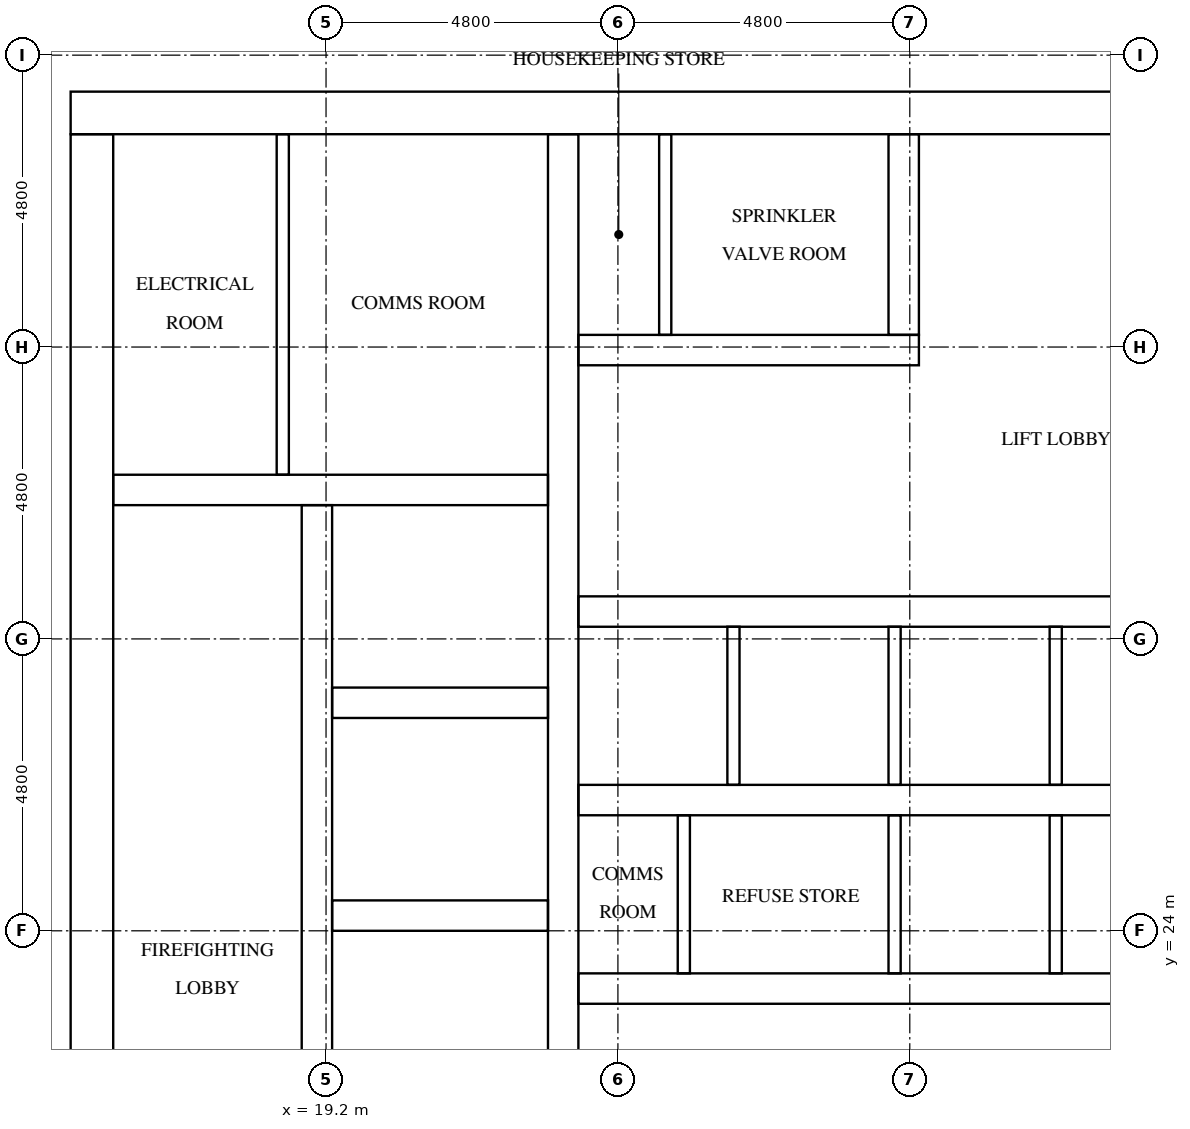
"""IFC4 building model, lengths in metres.
Left out: names, types, materials, properties, quantities, classifications, styles, units other than length and angle.
Written with IfcOpenShell. Run it as: python <this file> out.ifc"""

import sys

from ifc_helpers import new_model, si_unit, direction, frame, frame_2d, origin, place, context, subcontext, project, spatial, rectangle, extrude, element, fill, save


model = new_model("IFC4")
c1 = context("Model", 3, precision=1e-05, world=origin(), true_north=direction((0.0, 1.0)))
c2 = subcontext(c1, "Body", "Model", "MODEL_VIEW")
j1 = project(units=[si_unit("LENGTHUNIT", "METRE"), si_unit("PLANEANGLEUNIT", "RADIAN")], contexts=[c1])
p1 = place(None, origin())
s1 = spatial("IfcSite", under=j1, at=p1, CompositionType="ELEMENT")
p2 = place(p1, origin())
s2 = spatial("IfcBuilding", under=s1, at=p2, CompositionType="ELEMENT")
p3 = place(p2, frame((0.0, 0.0, 222.8)))
s3 = spatial("IfcBuildingStorey", under=s2, at=p3, CompositionType="ELEMENT", Elevation=222.8)
p4 = place(p3, frame((15.0, 37.45, 0.0), z_axis=(0.0, 0.0, 1.0), x_axis=(1.0, 0.0, 0.0)))
e1 = element("IfcWall", 1, at=p4, inside=s3, PredefinedType="SHEAR", context=c2, shape_type="SweptSolid", body=[
    extrude(rectangle(XDim=32.4, YDim=0.7, at=frame_2d((16.2, 0.0))), origin(), (0.0, 0.0, 1.0), 3.2),
])
p5 = place(p4, frame((15.3, 0.0, 0.0)))
e2 = element("IfcOpeningElement", 2, at=p5, cuts=e1, PredefinedType="OPENING", context=c2, shape_type="SweptSolid", body=[
    extrude(rectangle(XDim=1.8, YDim=2.1, at=frame_2d((0.9, 1.05))), frame((0.0, 0.36, 0.0), z_axis=(0.0, -1.0, 0.0), x_axis=(1.0, 0.0, 0.0)), (0.0, 0.0, 1.0), 0.72),
])
p6 = place(p4, frame((1.544, 0.0, 0.0)))
e3 = element("IfcOpeningElement", 3, at=p6, cuts=e1, PredefinedType="OPENING", context=c2, shape_type="SweptSolid", body=[
    extrude(rectangle(XDim=1.0, YDim=2.1, at=frame_2d((0.5, 1.05))), frame((0.0, 0.36, 0.0), z_axis=(0.0, -1.0, 0.0), x_axis=(1.0, 0.0, 0.0)), (0.0, 0.0, 1.0), 0.72),
])
p7 = place(p4, frame((5.219, 0.0, 0.0)))
e4 = element("IfcOpeningElement", 4, at=p7, cuts=e1, PredefinedType="OPENING", context=c2, shape_type="SweptSolid", body=[
    extrude(rectangle(XDim=1.0, YDim=2.1, at=frame_2d((0.5, 1.05))), frame((0.0, 0.36, 0.0), z_axis=(0.0, -1.0, 0.0), x_axis=(1.0, 0.0, 0.0)), (0.0, 0.0, 1.0), 0.72),
])
p8 = place(p3, frame((15.35, 15.7, 0.0), z_axis=(0.0, 0.0, 1.0), x_axis=(0.0, 1.0, 0.0)))
e5 = element("IfcWall", 5, at=p8, inside=s3, PredefinedType="SHEAR", context=c2, shape_type="SweptSolid", body=[
    extrude(rectangle(XDim=21.4, YDim=0.7, at=frame_2d((10.7, 0.0))), origin(), (0.0, 0.0, 1.0), 3.2),
])
p9 = place(p8, frame((5.06, 0.0, 0.0)))
e6 = element("IfcOpeningElement", 6, at=p9, cuts=e5, PredefinedType="OPENING", context=c2, shape_type="SweptSolid", body=[
    extrude(rectangle(XDim=1.2, YDim=2.1, at=frame_2d((0.6, 1.05))), frame((0.0, 0.36, 0.0), z_axis=(0.0, -1.0, 0.0), x_axis=(1.0, 0.0, 0.0)), (0.0, 0.0, 1.0), 0.72),
])
p10 = place(p3, frame((19.05, 15.7, 0.0), z_axis=(0.0, 0.0, 1.0), x_axis=(0.0, 1.0, 0.0)))
e7 = element("IfcWall", 7, at=p10, inside=s3, PredefinedType="SHEAR", context=c2, shape_type="SweptSolid", body=[
    extrude(rectangle(XDim=15.3, YDim=0.5, at=frame_2d((7.65, 0.0))), origin(), (0.0, 0.0, 1.0), 3.2),
])
p11 = place(p10, frame((9.75, 0.0, 0.0)))
e8 = element("IfcOpeningElement", 8, at=p11, cuts=e7, PredefinedType="OPENING", context=c2, shape_type="SweptSolid", body=[
    extrude(rectangle(XDim=1.1, YDim=2.1, at=frame_2d((0.55, 1.05))), frame((0.0, 0.26, 0.0), z_axis=(0.0, -1.0, 0.0), x_axis=(1.0, 0.0, 0.0)), (0.0, 0.0, 1.0), 0.52),
])
p12 = place(p10, frame((13.25, 0.0, 0.0)))
e9 = element("IfcOpeningElement", 9, at=p12, cuts=e7, PredefinedType="OPENING", context=c2, shape_type="SweptSolid", body=[
    extrude(rectangle(XDim=1.1, YDim=2.1, at=frame_2d((0.55, 1.05))), frame((0.0, 0.26, 0.0), z_axis=(0.0, -1.0, 0.0), x_axis=(1.0, 0.0, 0.0)), (0.0, 0.0, 1.0), 0.52),
])
p13 = place(p10, frame((0.5, 0.0, 0.0)))
e10 = element("IfcOpeningElement", 10, at=p13, cuts=e7, PredefinedType="OPENING", context=c2, shape_type="SweptSolid", body=[
    extrude(rectangle(XDim=1.2, YDim=2.1, at=frame_2d((0.6, 1.05))), frame((0.0, 0.26, 0.0), z_axis=(0.0, -1.0, 0.0), x_axis=(1.0, 0.0, 0.0)), (0.0, 0.0, 1.0), 0.52),
])
p14 = place(p3, frame((23.1, 15.7, 0.0), z_axis=(0.0, 0.0, 1.0), x_axis=(0.0, 1.0, 0.0)))
e11 = element("IfcWall", 11, at=p14, inside=s3, PredefinedType="SHEAR", context=c2, shape_type="SweptSolid", body=[
    extrude(rectangle(XDim=21.4, YDim=0.5, at=frame_2d((10.7, 0.0))), origin(), (0.0, 0.0, 1.0), 3.2),
])
for number, where, z_axis, x_axis in (
    (12, (19.3, 24.25, 0.0), (0.0, 0.0, 1.0), (1.0, 0.0, 0.0)),
    (13, (19.3, 27.75, 0.0), (0.0, 0.0, 1.0), (1.0, 0.0, 0.0)),
):
    element("IfcWall", number, at=place(p3, frame(where, z_axis=z_axis, x_axis=x_axis)), inside=s3, PredefinedType="SHEAR", context=c2, shape_type="SweptSolid", body=[
        extrude(rectangle(XDim=3.55, YDim=0.5, at=frame_2d((1.775, 0.0))), origin(), (0.0, 0.0, 1.0), 3.2),
    ])
p15 = place(p3, frame((15.7, 31.25, 0.0), z_axis=(0.0, 0.0, 1.0), x_axis=(1.0, 0.0, 0.0)))
e14 = element("IfcWall", 14, at=p15, inside=s3, PredefinedType="SHEAR", context=c2, shape_type="SweptSolid", body=[
    extrude(rectangle(XDim=7.15, YDim=0.5, at=frame_2d((3.575, 0.0))), origin(), (0.0, 0.0, 1.0), 3.2),
])
p16 = place(p3, frame((23.35, 23.05, 0.0), z_axis=(0.0, 0.0, 1.0), x_axis=(1.0, 0.0, 0.0)))
e15 = element("IfcWall", 15, at=p16, inside=s3, PredefinedType="SHEAR", context=c2, shape_type="SweptSolid", body=[
    extrude(rectangle(XDim=15.7, YDim=0.5, at=frame_2d((7.85, 0.0))), origin(), (0.0, 0.0, 1.0), 3.2),
])
p17 = place(p16, frame((0.317, 0.0, 0.0)))
e16 = element("IfcOpeningElement", 16, at=p17, cuts=e15, PredefinedType="OPENING", context=c2, shape_type="SweptSolid", body=[
    extrude(rectangle(XDim=1.0, YDim=2.1, at=frame_2d((0.5, 1.05))), frame((0.0, 0.26, 0.0), z_axis=(0.0, -1.0, 0.0), x_axis=(1.0, 0.0, 0.0)), (0.0, 0.0, 1.0), 0.52),
])
p18 = place(p16, frame((2.967, 0.0, 0.0)))
e17 = element("IfcOpeningElement", 17, at=p18, cuts=e15, PredefinedType="OPENING", context=c2, shape_type="SweptSolid", body=[
    extrude(rectangle(XDim=1.0, YDim=2.1, at=frame_2d((0.5, 1.05))), frame((0.0, 0.26, 0.0), z_axis=(0.0, -1.0, 0.0), x_axis=(1.0, 0.0, 0.0)), (0.0, 0.0, 1.0), 0.52),
])
p19 = place(p16, frame((10.917, 0.0, 0.0)))
e18 = element("IfcOpeningElement", 18, at=p19, cuts=e15, PredefinedType="OPENING", context=c2, shape_type="SweptSolid", body=[
    extrude(rectangle(XDim=1.0, YDim=2.1, at=frame_2d((0.5, 1.05))), frame((0.0, 0.26, 0.0), z_axis=(0.0, -1.0, 0.0), x_axis=(1.0, 0.0, 0.0)), (0.0, 0.0, 1.0), 0.52),
])
p20 = place(p16, frame((13.567, 0.0, 0.0)))
e19 = element("IfcOpeningElement", 19, at=p20, cuts=e15, PredefinedType="OPENING", context=c2, shape_type="SweptSolid", body=[
    extrude(rectangle(XDim=1.0, YDim=2.1, at=frame_2d((0.5, 1.05))), frame((0.0, 0.26, 0.0), z_axis=(0.0, -1.0, 0.0), x_axis=(1.0, 0.0, 0.0)), (0.0, 0.0, 1.0), 0.52),
])
p21 = place(p3, frame((23.35, 26.15, 0.0), z_axis=(0.0, 0.0, 1.0), x_axis=(1.0, 0.0, 0.0)))
e20 = element("IfcWall", 20, at=p21, inside=s3, PredefinedType="SHEAR", context=c2, shape_type="SweptSolid", body=[
    extrude(rectangle(XDim=15.7, YDim=0.5, at=frame_2d((7.85, 0.0))), origin(), (0.0, 0.0, 1.0), 3.2),
])
p22 = place(p3, frame((23.35, 29.25, 0.0), z_axis=(0.0, 0.0, 1.0), x_axis=(1.0, 0.0, 0.0)))
e21 = element("IfcWall", 21, at=p22, inside=s3, PredefinedType="SHEAR", context=c2, shape_type="SweptSolid", body=[
    extrude(rectangle(XDim=15.7, YDim=0.5, at=frame_2d((7.85, 0.0))), origin(), (0.0, 0.0, 1.0), 3.2),
])
p23 = place(p22, frame((0.675, 0.0, 0.0)))
e22 = element("IfcOpeningElement", 22, at=p23, cuts=e21, PredefinedType="OPENING", context=c2, shape_type="SweptSolid", body=[
    extrude(rectangle(XDim=1.1, YDim=2.1, at=frame_2d((0.55, 1.05))), frame((0.0, 0.26, 0.0), z_axis=(0.0, -1.0, 0.0), x_axis=(1.0, 0.0, 0.0)), (0.0, 0.0, 1.0), 0.52),
])
p24 = place(p22, frame((3.325, 0.0, 0.0)))
e23 = element("IfcOpeningElement", 23, at=p24, cuts=e21, PredefinedType="OPENING", context=c2, shape_type="SweptSolid", body=[
    extrude(rectangle(XDim=1.1, YDim=2.1, at=frame_2d((0.55, 1.05))), frame((0.0, 0.26, 0.0), z_axis=(0.0, -1.0, 0.0), x_axis=(1.0, 0.0, 0.0)), (0.0, 0.0, 1.0), 0.52),
])
p25 = place(p22, frame((5.975, 0.0, 0.0)))
e24 = element("IfcOpeningElement", 24, at=p25, cuts=e21, PredefinedType="OPENING", context=c2, shape_type="SweptSolid", body=[
    extrude(rectangle(XDim=1.1, YDim=2.1, at=frame_2d((0.55, 1.05))), frame((0.0, 0.26, 0.0), z_axis=(0.0, -1.0, 0.0), x_axis=(1.0, 0.0, 0.0)), (0.0, 0.0, 1.0), 0.52),
])
p26 = place(p22, frame((8.625, 0.0, 0.0)))
e25 = element("IfcOpeningElement", 25, at=p26, cuts=e21, PredefinedType="OPENING", context=c2, shape_type="SweptSolid", body=[
    extrude(rectangle(XDim=1.1, YDim=2.1, at=frame_2d((0.55, 1.05))), frame((0.0, 0.26, 0.0), z_axis=(0.0, -1.0, 0.0), x_axis=(1.0, 0.0, 0.0)), (0.0, 0.0, 1.0), 0.52),
])
p27 = place(p22, frame((11.275, 0.0, 0.0)))
e26 = element("IfcOpeningElement", 26, at=p27, cuts=e21, PredefinedType="OPENING", context=c2, shape_type="SweptSolid", body=[
    extrude(rectangle(XDim=1.1, YDim=2.1, at=frame_2d((0.55, 1.05))), frame((0.0, 0.26, 0.0), z_axis=(0.0, -1.0, 0.0), x_axis=(1.0, 0.0, 0.0)), (0.0, 0.0, 1.0), 0.52),
])
p28 = place(p22, frame((13.925, 0.0, 0.0)))
e27 = element("IfcOpeningElement", 27, at=p28, cuts=e21, PredefinedType="OPENING", context=c2, shape_type="SweptSolid", body=[
    extrude(rectangle(XDim=1.1, YDim=2.1, at=frame_2d((0.55, 1.05))), frame((0.0, 0.26, 0.0), z_axis=(0.0, -1.0, 0.0), x_axis=(1.0, 0.0, 0.0)), (0.0, 0.0, 1.0), 0.52),
])
p29 = place(p3, frame((23.35, 33.55, 0.0), z_axis=(0.0, 0.0, 1.0), x_axis=(1.0, 0.0, 0.0)))
e28 = element("IfcWall", 28, at=p29, inside=s3, PredefinedType="SHEAR", context=c2, shape_type="SweptSolid", body=[
    extrude(rectangle(XDim=5.6, YDim=0.5, at=frame_2d((2.8, 0.0))), origin(), (0.0, 0.0, 1.0), 3.2),
])
p30 = place(p29, frame((0.164, 0.0, 0.0)))
e29 = element("IfcOpeningElement", 29, at=p30, cuts=e28, PredefinedType="OPENING", context=c2, shape_type="SweptSolid", body=[
    extrude(rectangle(XDim=1.0, YDim=2.1, at=frame_2d((0.5, 1.05))), frame((0.0, 0.26, 0.0), z_axis=(0.0, -1.0, 0.0), x_axis=(1.0, 0.0, 0.0)), (0.0, 0.0, 1.0), 0.52),
])
p31 = place(p29, frame((2.814, 0.0, 0.0)))
e30 = element("IfcOpeningElement", 30, at=p31, cuts=e28, PredefinedType="OPENING", context=c2, shape_type="SweptSolid", body=[
    extrude(rectangle(XDim=1.0, YDim=2.1, at=frame_2d((0.5, 1.05))), frame((0.0, 0.26, 0.0), z_axis=(0.0, -1.0, 0.0), x_axis=(1.0, 0.0, 0.0)), (0.0, 0.0, 1.0), 0.52),
])
p32 = place(p3, frame((28.7, 33.8, 0.0), z_axis=(0.0, 0.0, 1.0), x_axis=(0.0, 1.0, 0.0)))
e31 = element("IfcWall", 31, at=p32, inside=s3, PredefinedType="SHEAR", context=c2, shape_type="SweptSolid", body=[
    extrude(rectangle(XDim=3.3, YDim=0.5, at=frame_2d((1.65, 0.0))), origin(), (0.0, 0.0, 1.0), 3.2),
])
p33 = place(p3, frame((25.9, 26.4, 0.0), z_axis=(0.0, 0.0, 1.0), x_axis=(0.0, 1.0, 0.0)))
e32 = element("IfcWall", 32, at=p33, inside=s3, PredefinedType="SOLIDWALL", context=c2, shape_type="SweptSolid", body=[
    extrude(rectangle(XDim=2.6, YDim=0.2, at=frame_2d((1.3, 0.0))), origin(), (0.0, 0.0, 1.0), 3.2),
])
p34 = place(p3, frame((28.55, 23.3, 0.0), z_axis=(0.0, 0.0, 1.0), x_axis=(0.0, 1.0, 0.0)))
e33 = element("IfcWall", 33, at=p34, inside=s3, PredefinedType="SOLIDWALL", context=c2, shape_type="SweptSolid", body=[
    extrude(rectangle(XDim=2.6, YDim=0.2, at=frame_2d((1.3, 0.0))), origin(), (0.0, 0.0, 1.0), 3.2),
])
p35 = place(p3, frame((28.55, 26.4, 0.0), z_axis=(0.0, 0.0, 1.0), x_axis=(0.0, 1.0, 0.0)))
e34 = element("IfcWall", 34, at=p35, inside=s3, PredefinedType="SOLIDWALL", context=c2, shape_type="SweptSolid", body=[
    extrude(rectangle(XDim=2.6, YDim=0.2, at=frame_2d((1.3, 0.0))), origin(), (0.0, 0.0, 1.0), 3.2),
])
p36 = place(p3, frame((31.2, 23.3, 0.0), z_axis=(0.0, 0.0, 1.0), x_axis=(0.0, 1.0, 0.0)))
e35 = element("IfcWall", 35, at=p36, inside=s3, PredefinedType="SOLIDWALL", context=c2, shape_type="SweptSolid", body=[
    extrude(rectangle(XDim=2.6, YDim=0.2, at=frame_2d((1.3, 0.0))), origin(), (0.0, 0.0, 1.0), 3.2),
])
p37 = place(p3, frame((31.2, 26.4, 0.0), z_axis=(0.0, 0.0, 1.0), x_axis=(0.0, 1.0, 0.0)))
e36 = element("IfcWall", 36, at=p37, inside=s3, PredefinedType="SOLIDWALL", context=c2, shape_type="SweptSolid", body=[
    extrude(rectangle(XDim=2.6, YDim=0.2, at=frame_2d((1.3, 0.0))), origin(), (0.0, 0.0, 1.0), 3.2),
])
p38 = place(p3, frame((18.489, 31.5, 0.0), z_axis=(0.0, 0.0, 1.0), x_axis=(0.0, 1.0, 0.0)))
e37 = element("IfcWall", 37, at=p38, inside=s3, PredefinedType="PARTITIONING", context=c2, shape_type="SweptSolid", body=[
    extrude(rectangle(XDim=5.6, YDim=0.2, at=frame_2d((2.8, 0.0))), origin(), (0.0, 0.0, 1.0), 3.2),
])
p39 = place(p3, frame((25.084, 23.3, 0.0), z_axis=(0.0, 0.0, 1.0), x_axis=(0.0, 1.0, 0.0)))
e38 = element("IfcWall", 38, at=p39, inside=s3, PredefinedType="PARTITIONING", context=c2, shape_type="SweptSolid", body=[
    extrude(rectangle(XDim=2.6, YDim=0.2, at=frame_2d((1.3, 0.0))), origin(), (0.0, 0.0, 1.0), 3.2),
])
p40 = place(p3, frame((24.778, 33.8, 0.0), z_axis=(0.0, 0.0, 1.0), x_axis=(0.0, 1.0, 0.0)))
e39 = element("IfcWall", 39, at=p40, inside=s3, PredefinedType="PARTITIONING", context=c2, shape_type="SweptSolid", body=[
    extrude(rectangle(XDim=3.3, YDim=0.2, at=frame_2d((1.65, 0.0))), origin(), (0.0, 0.0, 1.0), 3.2),
])
p41 = place(p23, origin())
e40 = element("IfcDoor", 40, at=p41, inside=s3, OperationType="DOUBLE_DOOR_SLIDING", PredefinedType="DOOR", context=c2, shape_type="SweptSolid", body=[
    extrude(rectangle(XDim=1.1, YDim=2.1, at=frame_2d((0.55, 1.05))), frame((0.0, 0.025, 0.0), z_axis=(0.0, -1.0, 0.0), x_axis=(1.0, 0.0, 0.0)), (0.0, 0.0, 1.0), 0.05),
])
fill(e22, e40)
p42 = place(p24, origin())
e41 = element("IfcDoor", 41, at=p42, inside=s3, OperationType="DOUBLE_DOOR_SLIDING", PredefinedType="DOOR", context=c2, shape_type="SweptSolid", body=[
    extrude(rectangle(XDim=1.1, YDim=2.1, at=frame_2d((0.55, 1.05))), frame((0.0, 0.025, 0.0), z_axis=(0.0, -1.0, 0.0), x_axis=(1.0, 0.0, 0.0)), (0.0, 0.0, 1.0), 0.05),
])
fill(e23, e41)
p43 = place(p25, origin())
e42 = element("IfcDoor", 42, at=p43, inside=s3, OperationType="DOUBLE_DOOR_SLIDING", PredefinedType="DOOR", context=c2, shape_type="SweptSolid", body=[
    extrude(rectangle(XDim=1.1, YDim=2.1, at=frame_2d((0.55, 1.05))), frame((0.0, 0.025, 0.0), z_axis=(0.0, -1.0, 0.0), x_axis=(1.0, 0.0, 0.0)), (0.0, 0.0, 1.0), 0.05),
])
fill(e24, e42)
p44 = place(p26, origin())
e43 = element("IfcDoor", 43, at=p44, inside=s3, OperationType="DOUBLE_DOOR_SLIDING", PredefinedType="DOOR", context=c2, shape_type="SweptSolid", body=[
    extrude(rectangle(XDim=1.1, YDim=2.1, at=frame_2d((0.55, 1.05))), frame((0.0, 0.025, 0.0), z_axis=(0.0, -1.0, 0.0), x_axis=(1.0, 0.0, 0.0)), (0.0, 0.0, 1.0), 0.05),
])
fill(e25, e43)
p45 = place(p11, origin())
e44 = element("IfcDoor", 44, at=p45, inside=s3, OperationType="DOUBLE_DOOR_SLIDING", PredefinedType="DOOR", context=c2, shape_type="SweptSolid", body=[
    extrude(rectangle(XDim=1.1, YDim=2.1, at=frame_2d((0.55, 1.05))), frame((0.0, 0.025, 0.0), z_axis=(0.0, -1.0, 0.0), x_axis=(1.0, 0.0, 0.0)), (0.0, 0.0, 1.0), 0.05),
])
fill(e8, e44)
p46 = place(p12, origin())
e45 = element("IfcDoor", 45, at=p46, inside=s3, OperationType="DOUBLE_DOOR_SLIDING", PredefinedType="DOOR", context=c2, shape_type="SweptSolid", body=[
    extrude(rectangle(XDim=1.1, YDim=2.1, at=frame_2d((0.55, 1.05))), frame((0.0, 0.025, 0.0), z_axis=(0.0, -1.0, 0.0), x_axis=(1.0, 0.0, 0.0)), (0.0, 0.0, 1.0), 0.05),
])
fill(e9, e45)
p47 = place(p5, origin())
e46 = element("IfcDoor", 46, at=p47, inside=s3, OperationType="DOUBLE_DOOR_SINGLE_SWING", PredefinedType="DOOR", context=c2, shape_type="SweptSolid", body=[
    extrude(rectangle(XDim=1.8, YDim=2.1, at=frame_2d((0.9, 1.05))), frame((0.0, 0.025, 0.0), z_axis=(0.0, -1.0, 0.0), x_axis=(1.0, 0.0, 0.0)), (0.0, 0.0, 1.0), 0.05),
])
fill(e2, e46)
p48 = place(p6, origin())
e47 = element("IfcDoor", 47, at=p48, inside=s3, OperationType="SINGLE_SWING_LEFT", PredefinedType="DOOR", context=c2, shape_type="SweptSolid", body=[
    extrude(rectangle(XDim=1.0, YDim=2.1, at=frame_2d((0.5, 1.05))), frame((0.0, 0.025, 0.0), z_axis=(0.0, -1.0, 0.0), x_axis=(1.0, 0.0, 0.0)), (0.0, 0.0, 1.0), 0.05),
])
fill(e3, e47)
p49 = place(p7, origin())
e48 = element("IfcDoor", 48, at=p49, inside=s3, OperationType="SINGLE_SWING_RIGHT", PredefinedType="DOOR", context=c2, shape_type="SweptSolid", body=[
    extrude(rectangle(XDim=1.0, YDim=2.1, at=frame_2d((0.5, 1.05))), frame((0.0, 0.025, 0.0), z_axis=(0.0, -1.0, 0.0), x_axis=(1.0, 0.0, 0.0)), (0.0, 0.0, 1.0), 0.05),
])
fill(e4, e48)
p50 = place(p17, frame((1.0, 0.0, 0.0), z_axis=(0.0, 0.0, 1.0), x_axis=(-1.0, 0.0, 0.0)))
e49 = element("IfcDoor", 49, at=p50, inside=s3, OperationType="SINGLE_SWING_LEFT", PredefinedType="DOOR", context=c2, shape_type="SweptSolid", body=[
    extrude(rectangle(XDim=1.0, YDim=2.1, at=frame_2d((0.5, 1.05))), frame((0.0, 0.025, 0.0), z_axis=(0.0, -1.0, 0.0), x_axis=(1.0, 0.0, 0.0)), (0.0, 0.0, 1.0), 0.05),
])
fill(e16, e49)
p51 = place(p18, frame((1.0, 0.0, 0.0), z_axis=(0.0, 0.0, 1.0), x_axis=(-1.0, 0.0, 0.0)))
e50 = element("IfcDoor", 50, at=p51, inside=s3, OperationType="SINGLE_SWING_RIGHT", PredefinedType="DOOR", context=c2, shape_type="SweptSolid", body=[
    extrude(rectangle(XDim=1.0, YDim=2.1, at=frame_2d((0.5, 1.05))), frame((0.0, 0.025, 0.0), z_axis=(0.0, -1.0, 0.0), x_axis=(1.0, 0.0, 0.0)), (0.0, 0.0, 1.0), 0.05),
])
fill(e17, e50)
p52 = place(p30, frame((1.0, 0.0, 0.0), z_axis=(0.0, 0.0, 1.0), x_axis=(-1.0, 0.0, 0.0)))
e51 = element("IfcDoor", 51, at=p52, inside=s3, OperationType="SINGLE_SWING_LEFT", PredefinedType="DOOR", context=c2, shape_type="SweptSolid", body=[
    extrude(rectangle(XDim=1.0, YDim=2.1, at=frame_2d((0.5, 1.05))), frame((0.0, 0.025, 0.0), z_axis=(0.0, -1.0, 0.0), x_axis=(1.0, 0.0, 0.0)), (0.0, 0.0, 1.0), 0.05),
])
fill(e29, e51)
p53 = place(p31, frame((1.0, 0.0, 0.0), z_axis=(0.0, 0.0, 1.0), x_axis=(-1.0, 0.0, 0.0)))
e52 = element("IfcDoor", 52, at=p53, inside=s3, OperationType="SINGLE_SWING_RIGHT", PredefinedType="DOOR", context=c2, shape_type="SweptSolid", body=[
    extrude(rectangle(XDim=1.0, YDim=2.1, at=frame_2d((0.5, 1.05))), frame((0.0, 0.025, 0.0), z_axis=(0.0, -1.0, 0.0), x_axis=(1.0, 0.0, 0.0)), (0.0, 0.0, 1.0), 0.05),
])
fill(e30, e52)
save(model, sys.argv[1])
